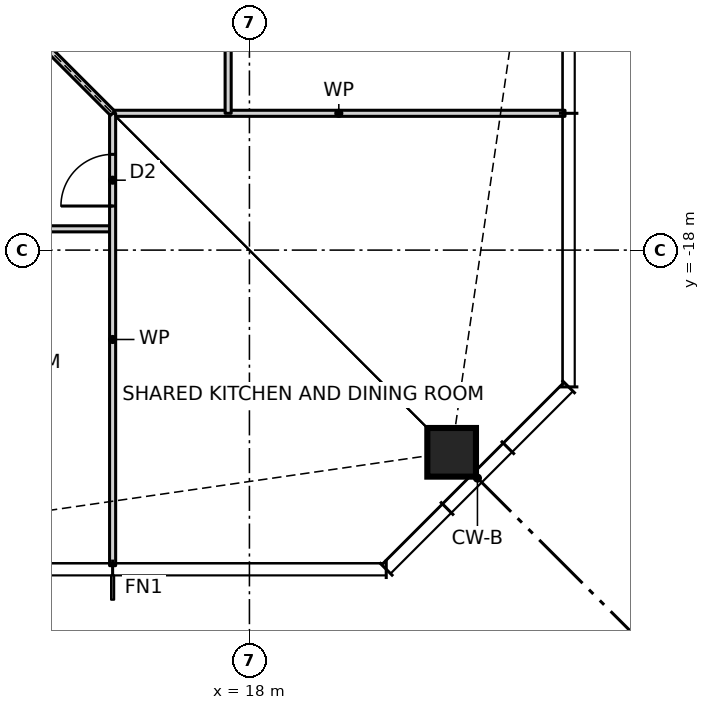
"""IFC4 building model, lengths in metres.
Left out: names, types, materials, properties, quantities, classifications, styles, units other than length and angle.
Written with IfcOpenShell. Run it as: python <this file> out.ifc"""

import sys

from ifc_helpers import new_model, si_unit, direction, frame, frame_2d, origin, origin_2d, place, context, subcontext, project, spatial, rectangle, hollow_rectangle, extrude, element, fill, save


model = new_model("IFC4")
c1 = context("Model", 3, precision=1e-05, world=origin(), true_north=direction((0.0, 1.0)))
c2 = subcontext(c1, "Body", "Model", "MODEL_VIEW")
j1 = project(units=[si_unit("LENGTHUNIT", "METRE"), si_unit("PLANEANGLEUNIT", "RADIAN")], contexts=[c1])
p1 = place(None, origin())
s1 = spatial("IfcSite", under=j1, at=p1, CompositionType="ELEMENT")
p2 = place(p1, origin())
s2 = spatial("IfcBuilding", under=s1, at=p2, CompositionType="ELEMENT")
p3 = place(p2, frame((0.0, 0.0, 57.0)))
s3 = spatial("IfcBuildingStorey", under=s2, at=p3, CompositionType="ELEMENT", Elevation=57.0)
p4 = place(p3, frame((21.326, -21.326, 0.0), z_axis=(0.0, 0.0, 1.0), x_axis=(1.0, 0.0, 0.0)))
e1 = element("IfcColumn", 1, at=p4, inside=s3, PredefinedType="COLUMN", context=c2, shape_type="SweptSolid", body=[
    extrude(hollow_rectangle(XDim=0.8, YDim=0.8, WallThickness=0.09, at=origin_2d()), origin(), (0.0, 0.0, 1.0), 3.5),
])
p5 = place(p3, frame((-15.75, -17.65, 0.0), z_axis=(0.0, 0.0, 1.0), x_axis=(1.0, 0.0, 0.0)))
e2 = element("IfcWall", 2, at=p5, inside=s3, PredefinedType="PARTITIONING", context=c2, shape_type="SweptSolid", body=[
    extrude(rectangle(XDim=31.5, YDim=0.1, at=frame_2d((15.75, 0.0))), origin(), (0.0, 0.0, 1.0), 3.27),
])
p6 = place(p5, frame((1.8, 0.0, 0.0)))
e3 = element("IfcOpeningElement", 3, at=p6, cuts=e2, PredefinedType="OPENING", context=c2, shape_type="SweptSolid", body=[
    extrude(rectangle(XDim=0.9, YDim=2.1, at=frame_2d((0.45, 1.05))), frame((0.0, 0.06, 0.0), z_axis=(0.0, -1.0, 0.0), x_axis=(1.0, 0.0, 0.0)), (0.0, 0.0, 1.0), 0.12),
])
p7 = place(p5, frame((6.3, 0.0, 0.0)))
e4 = element("IfcOpeningElement", 4, at=p7, cuts=e2, PredefinedType="OPENING", context=c2, shape_type="SweptSolid", body=[
    extrude(rectangle(XDim=0.9, YDim=2.1, at=frame_2d((0.45, 1.05))), frame((0.0, 0.06, 0.0), z_axis=(0.0, -1.0, 0.0), x_axis=(1.0, 0.0, 0.0)), (0.0, 0.0, 1.0), 0.12),
])
p8 = place(p5, frame((10.8, 0.0, 0.0)))
e5 = element("IfcOpeningElement", 5, at=p8, cuts=e2, PredefinedType="OPENING", context=c2, shape_type="SweptSolid", body=[
    extrude(rectangle(XDim=0.9, YDim=2.1, at=frame_2d((0.45, 1.05))), frame((0.0, 0.06, 0.0), z_axis=(0.0, -1.0, 0.0), x_axis=(1.0, 0.0, 0.0)), (0.0, 0.0, 1.0), 0.12),
])
p9 = place(p5, frame((15.3, 0.0, 0.0)))
e6 = element("IfcOpeningElement", 6, at=p9, cuts=e2, PredefinedType="OPENING", context=c2, shape_type="SweptSolid", body=[
    extrude(rectangle(XDim=0.9, YDim=2.1, at=frame_2d((0.45, 1.05))), frame((0.0, 0.06, 0.0), z_axis=(0.0, -1.0, 0.0), x_axis=(1.0, 0.0, 0.0)), (0.0, 0.0, 1.0), 0.12),
])
p10 = place(p5, frame((19.8, 0.0, 0.0)))
e7 = element("IfcOpeningElement", 7, at=p10, cuts=e2, PredefinedType="OPENING", context=c2, shape_type="SweptSolid", body=[
    extrude(rectangle(XDim=0.9, YDim=2.1, at=frame_2d((0.45, 1.05))), frame((0.0, 0.06, 0.0), z_axis=(0.0, -1.0, 0.0), x_axis=(1.0, 0.0, 0.0)), (0.0, 0.0, 1.0), 0.12),
])
p11 = place(p5, frame((24.3, 0.0, 0.0)))
e8 = element("IfcOpeningElement", 8, at=p11, cuts=e2, PredefinedType="OPENING", context=c2, shape_type="SweptSolid", body=[
    extrude(rectangle(XDim=0.9, YDim=2.1, at=frame_2d((0.45, 1.05))), frame((0.0, 0.06, 0.0), z_axis=(0.0, -1.0, 0.0), x_axis=(1.0, 0.0, 0.0)), (0.0, 0.0, 1.0), 0.12),
])
p12 = place(p5, frame((28.8, 0.0, 0.0)))
e9 = element("IfcOpeningElement", 9, at=p12, cuts=e2, PredefinedType="OPENING", context=c2, shape_type="SweptSolid", body=[
    extrude(rectangle(XDim=0.9, YDim=2.1, at=frame_2d((0.45, 1.05))), frame((0.0, 0.06, 0.0), z_axis=(0.0, -1.0, 0.0), x_axis=(1.0, 0.0, 0.0)), (0.0, 0.0, 1.0), 0.12),
])
p13 = place(p3, frame((15.75, -15.75, 0.0), z_axis=(0.0, 0.0, 1.0), x_axis=(1.0, 0.0, 0.0)))
e10 = element("IfcWall", 10, at=p13, inside=s3, PredefinedType="PARTITIONING", context=c2, shape_type="SweptSolid", body=[
    extrude(rectangle(XDim=7.44, YDim=0.1, at=frame_2d((3.72, 0.0))), origin(), (0.0, 0.0, 1.0), 3.27),
])
p14 = place(p3, frame((17.65, -15.75, 0.0), z_axis=(0.0, 0.0, 1.0), x_axis=(0.0, 1.0, 0.0)))
e11 = element("IfcWall", 11, at=p14, inside=s3, PredefinedType="PARTITIONING", context=c2, shape_type="SweptSolid", body=[
    extrude(rectangle(XDim=27.0, YDim=0.1, at=frame_2d((13.5, 0.0))), origin(), (0.0, 0.0, 1.0), 3.27),
])
p15 = place(p14, frame((1.8, 0.0, 0.0)))
e12 = element("IfcOpeningElement", 12, at=p15, cuts=e11, PredefinedType="OPENING", context=c2, shape_type="SweptSolid", body=[
    extrude(rectangle(XDim=0.9, YDim=2.1, at=frame_2d((0.45, 1.05))), frame((0.0, 0.06, 0.0), z_axis=(0.0, -1.0, 0.0), x_axis=(1.0, 0.0, 0.0)), (0.0, 0.0, 1.0), 0.12),
])
p16 = place(p14, frame((6.3, 0.0, 0.0)))
e13 = element("IfcOpeningElement", 13, at=p16, cuts=e11, PredefinedType="OPENING", context=c2, shape_type="SweptSolid", body=[
    extrude(rectangle(XDim=0.9, YDim=2.1, at=frame_2d((0.45, 1.05))), frame((0.0, 0.06, 0.0), z_axis=(0.0, -1.0, 0.0), x_axis=(1.0, 0.0, 0.0)), (0.0, 0.0, 1.0), 0.12),
])
p17 = place(p14, frame((10.8, 0.0, 0.0)))
e14 = element("IfcOpeningElement", 14, at=p17, cuts=e11, PredefinedType="OPENING", context=c2, shape_type="SweptSolid", body=[
    extrude(rectangle(XDim=0.9, YDim=2.1, at=frame_2d((0.45, 1.05))), frame((0.0, 0.06, 0.0), z_axis=(0.0, -1.0, 0.0), x_axis=(1.0, 0.0, 0.0)), (0.0, 0.0, 1.0), 0.12),
])
p18 = place(p14, frame((15.3, 0.0, 0.0)))
e15 = element("IfcOpeningElement", 15, at=p18, cuts=e11, PredefinedType="OPENING", context=c2, shape_type="SweptSolid", body=[
    extrude(rectangle(XDim=0.9, YDim=2.1, at=frame_2d((0.45, 1.05))), frame((0.0, 0.06, 0.0), z_axis=(0.0, -1.0, 0.0), x_axis=(1.0, 0.0, 0.0)), (0.0, 0.0, 1.0), 0.12),
])
p19 = place(p14, frame((19.8, 0.0, 0.0)))
e16 = element("IfcOpeningElement", 16, at=p19, cuts=e11, PredefinedType="OPENING", context=c2, shape_type="SweptSolid", body=[
    extrude(rectangle(XDim=0.9, YDim=2.1, at=frame_2d((0.45, 1.05))), frame((0.0, 0.06, 0.0), z_axis=(0.0, -1.0, 0.0), x_axis=(1.0, 0.0, 0.0)), (0.0, 0.0, 1.0), 0.12),
])
p20 = place(p14, frame((24.3, 0.0, 0.0)))
e17 = element("IfcOpeningElement", 17, at=p20, cuts=e11, PredefinedType="OPENING", context=c2, shape_type="SweptSolid", body=[
    extrude(rectangle(XDim=0.9, YDim=2.1, at=frame_2d((0.45, 1.05))), frame((0.0, 0.06, 0.0), z_axis=(0.0, -1.0, 0.0), x_axis=(1.0, 0.0, 0.0)), (0.0, 0.0, 1.0), 0.12),
])
p21 = place(p3, frame((15.75, -23.19, 0.0), z_axis=(0.0, 0.0, 1.0), x_axis=(0.0, 1.0, 0.0)))
e18 = element("IfcWall", 18, at=p21, inside=s3, PredefinedType="PARTITIONING", context=c2, shape_type="SweptSolid", body=[
    extrude(rectangle(XDim=7.44, YDim=0.1, at=frame_2d((3.72, 0.0))), origin(), (0.0, 0.0, 1.0), 3.27),
])
p22 = place(p21, frame((5.915, 0.0, 0.0)))
e19 = element("IfcOpeningElement", 19, at=p22, cuts=e18, PredefinedType="OPENING", context=c2, shape_type="SweptSolid", body=[
    extrude(rectangle(XDim=0.85, YDim=2.1, at=frame_2d((0.425, 1.05))), frame((0.0, 0.06, 0.0), z_axis=(0.0, -1.0, 0.0), x_axis=(1.0, 0.0, 0.0)), (0.0, 0.0, 1.0), 0.12),
])
p23 = place(p3, frame((15.75, -15.75, 0.0), z_axis=(0.0, 0.0, 1.0), x_axis=(-0.707106781187, 0.707106781187, 0.0)))
e20 = element("IfcWall", 20, at=p23, inside=s3, PredefinedType="PARTITIONING", context=c2, shape_type="SweptSolid", body=[
    extrude(rectangle(XDim=5.869, YDim=0.1, at=frame_2d((2.935, 0.0))), origin(), (0.0, 0.0, 1.0), 2.343),
])
p24 = place(p22, origin())
e21 = element("IfcDoor", 21, at=p24, inside=s3, OperationType="SINGLE_SWING_LEFT", PredefinedType="DOOR", context=c2, shape_type="SweptSolid", body=[
    extrude(rectangle(XDim=0.85, YDim=2.1, at=frame_2d((0.425, 1.05))), frame((0.0, 0.025, 0.0), z_axis=(0.0, -1.0, 0.0), x_axis=(1.0, 0.0, 0.0)), (0.0, 0.0, 1.0), 0.05),
])
fill(e19, e21)
save(model, sys.argv[1])
